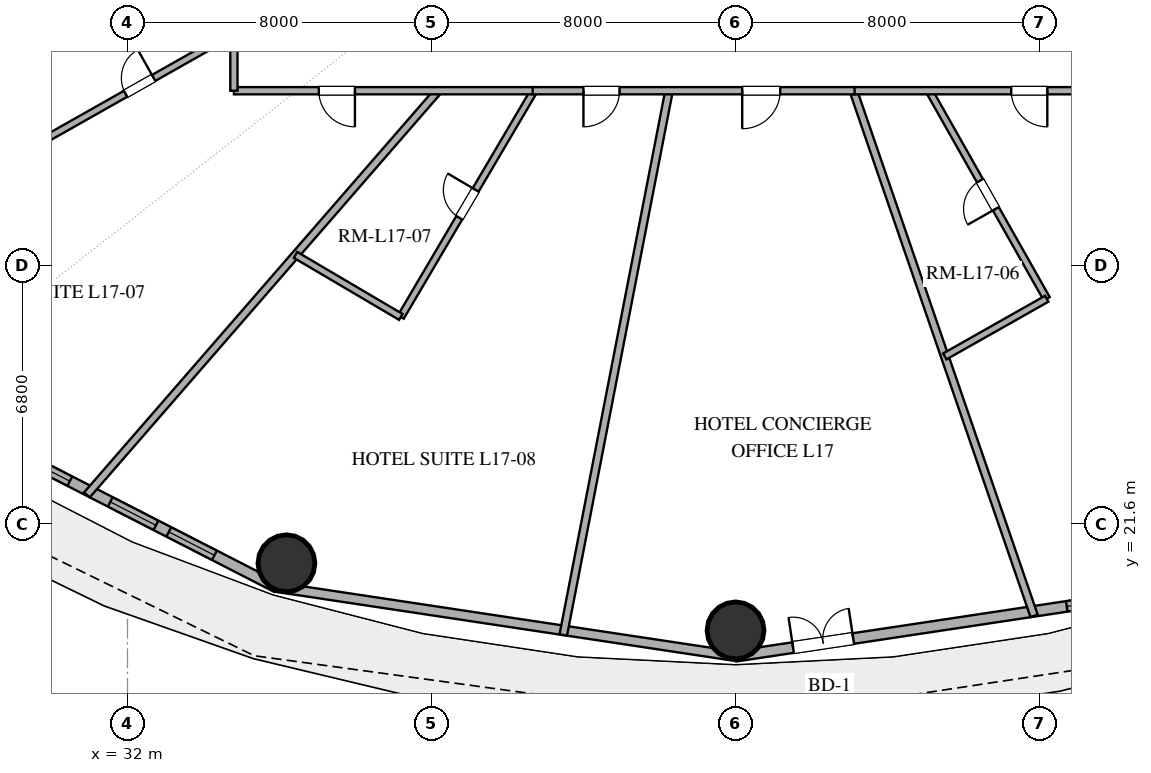
"""IFC4 building model, lengths in metres.
Left out: names, types, materials, properties, quantities, classifications, styles, units other than length and angle.
Written with IfcOpenShell. Run it as: python <this file> out.ifc"""

import sys

from ifc_helpers import new_model, si_unit, direction, frame, frame_2d, origin, origin_2d, place, context, subcontext, project, spatial, rectangle, hollow_circle, extrude, element, fill, save


model = new_model("IFC4")
c1 = context("Model", 3, precision=1e-05, world=origin(), true_north=direction((0.0, 1.0)))
c2 = subcontext(c1, "Body", "Model", "MODEL_VIEW")
j1 = project(units=[si_unit("LENGTHUNIT", "METRE"), si_unit("PLANEANGLEUNIT", "RADIAN")], contexts=[c1])
p1 = place(None, origin())
s1 = spatial("IfcSite", under=j1, at=p1, CompositionType="ELEMENT")
p2 = place(p1, origin())
s2 = spatial("IfcBuilding", under=s1, at=p2, CompositionType="ELEMENT")
p3 = place(p2, frame((0.0, 0.0, 71.4)))
s3 = spatial("IfcBuildingStorey", under=s2, at=p3, CompositionType="ELEMENT", Elevation=71.4)
for number, where, z_axis, x_axis in (
    (1, (36.182, 20.566, 0.0), (0.0, 0.0, 1.0), (1.0, 0.0, 0.0)),
    (2, (48.0, 18.8, 0.0), (0.0, 0.0, 1.0), (1.0, 0.0, 0.0)),
):
    element("IfcColumn", number, at=place(p3, frame(where, z_axis=z_axis, x_axis=x_axis)), inside=s3, PredefinedType="COLUMN", context=c2, shape_type="SweptSolid", body=[
        extrude(hollow_circle(Radius=0.75, WallThickness=0.04, at=origin_2d()), origin(), (0.0, 0.0, 1.0), 3.38),
    ])
p4 = place(p3, frame((25.826, 25.114, 0.0), z_axis=(0.0, 0.0, 1.0), x_axis=(0.889853976658, -0.456245438581, 0.0)))
e3 = element("IfcWall", 3, at=p4, inside=s3, PredefinedType="SOLIDWALL", context=c2, shape_type="SweptSolid", body=[
    extrude(rectangle(XDim=11.346, YDim=0.28, at=frame_2d((5.673, 0.0))), origin(), (0.0, 0.0, 1.0), 3.38),
])
p5 = place(p4, frame((1.92, 0.0, 0.85)))
e4 = element("IfcOpeningElement", 4, at=p5, cuts=e3, PredefinedType="OPENING", context=c2, shape_type="SweptSolid", body=[
    extrude(rectangle(XDim=1.5, YDim=1.8, at=frame_2d((0.75, 0.9))), frame((0.0, 0.15, 0.0), z_axis=(0.0, -1.0, 0.0), x_axis=(1.0, 0.0, 0.0)), (0.0, 0.0, 1.0), 0.3),
])
p6 = place(p4, frame((3.734, 0.0, 0.85)))
e5 = element("IfcOpeningElement", 5, at=p6, cuts=e3, PredefinedType="OPENING", context=c2, shape_type="SweptSolid", body=[
    extrude(rectangle(XDim=1.5, YDim=1.8, at=frame_2d((0.75, 0.9))), frame((0.0, 0.15, 0.0), z_axis=(0.0, -1.0, 0.0), x_axis=(1.0, 0.0, 0.0)), (0.0, 0.0, 1.0), 0.3),
])
p7 = place(p4, frame((6.429, 0.0, 0.85)))
e6 = element("IfcOpeningElement", 6, at=p7, cuts=e3, PredefinedType="OPENING", context=c2, shape_type="SweptSolid", body=[
    extrude(rectangle(XDim=1.35, YDim=1.8, at=frame_2d((0.675, 0.9))), frame((0.0, 0.15, 0.0), z_axis=(0.0, -1.0, 0.0), x_axis=(1.0, 0.0, 0.0)), (0.0, 0.0, 1.0), 0.3),
])
p8 = place(p4, frame((8.16, 0.0, 0.85)))
e7 = element("IfcOpeningElement", 7, at=p8, cuts=e3, PredefinedType="OPENING", context=c2, shape_type="SweptSolid", body=[
    extrude(rectangle(XDim=1.35, YDim=1.8, at=frame_2d((0.675, 0.9))), frame((0.0, 0.15, 0.0), z_axis=(0.0, -1.0, 0.0), x_axis=(1.0, 0.0, 0.0)), (0.0, 0.0, 1.0), 0.3),
])
p9 = place(p3, frame((35.922, 19.938, 0.0), z_axis=(0.0, 0.0, 1.0), x_axis=(0.988864835849, -0.148816452121, 0.0)))
e8 = element("IfcWall", 8, at=p9, inside=s3, PredefinedType="SOLIDWALL", context=c2, shape_type="SweptSolid", body=[
    extrude(rectangle(XDim=12.214, YDim=0.25, at=frame_2d((6.107, 0.0))), origin(), (0.0, 0.0, 1.0), 3.38),
])
p10 = place(p3, frame((48.0, 18.12, 0.0), z_axis=(0.0, 0.0, 1.0), x_axis=(0.988864835849, 0.148816452121, 0.0)))
e9 = element("IfcWall", 9, at=p10, inside=s3, PredefinedType="SOLIDWALL", context=c2, shape_type="SweptSolid", body=[
    extrude(rectangle(XDim=12.214, YDim=0.28, at=frame_2d((6.107, 0.0))), origin(), (0.0, 0.0, 1.0), 3.38),
])
p11 = place(p10, frame((1.531, 0.0, 0.0)))
e10 = element("IfcOpeningElement", 10, at=p11, cuts=e9, PredefinedType="OPENING", context=c2, shape_type="SweptSolid", body=[
    extrude(rectangle(XDim=1.6, YDim=2.25, at=frame_2d((0.8, 1.125))), frame((0.0, 0.15, 0.0), z_axis=(0.0, -1.0, 0.0), x_axis=(1.0, 0.0, 0.0)), (0.0, 0.0, 1.0), 0.3),
])
p12 = place(p10, frame((8.814, 0.0, 0.85)))
e11 = element("IfcOpeningElement", 11, at=p12, cuts=e9, PredefinedType="OPENING", context=c2, shape_type="SweptSolid", body=[
    extrude(rectangle(XDim=1.2, YDim=1.6, at=frame_2d((0.6, 0.8))), frame((0.0, 0.15, 0.0), z_axis=(0.0, -1.0, 0.0), x_axis=(1.0, 0.0, 0.0)), (0.0, 0.0, 1.0), 0.3),
])
p13 = place(p3, frame((43.467, 18.681, 0.0), z_axis=(0.0, 0.0, 1.0), x_axis=(0.190799326792, 0.981629062781, 0.0)))
e12 = element("IfcWall", 12, at=p13, inside=s3, PredefinedType="PARTITIONING", context=c2, shape_type="SweptSolid", body=[
    extrude(rectangle(XDim=14.587, YDim=0.2, at=frame_2d((7.293, 0.0))), origin(), (0.0, 0.0, 1.0), 2.74),
])
p14 = place(p3, frame((34.8, 37.455, 0.0), z_axis=(0.0, 0.0, 1.0), x_axis=(-0.945518845989, -0.325567369186, 0.0)))
e13 = element("IfcWall", 13, at=p14, inside=s3, PredefinedType="PARTITIONING", context=c2, shape_type="SweptSolid", body=[
    extrude(rectangle(XDim=15.909, YDim=0.2, at=frame_2d((7.955, 0.0))), origin(), (0.0, 0.0, 1.0), 2.74),
])
p15 = place(p3, frame((40.177, 33.0, 0.0), z_axis=(0.0, 0.0, 1.0), x_axis=(-0.656066321773, -0.754703240641, 0.0)))
e14 = element("IfcWall", 14, at=p15, inside=s3, PredefinedType="PARTITIONING", context=c2, shape_type="SweptSolid", body=[
    extrude(rectangle(XDim=14.091, YDim=0.2, at=frame_2d((7.045, 0.0))), origin(), (0.0, 0.0, 1.0), 2.74),
])
p16 = place(p3, frame((51.099, 33.0, 0.0), z_axis=(0.0, 0.0, 1.0), x_axis=(0.325569992405, -0.945517942741, 0.0)))
e15 = element("IfcWall", 15, at=p16, inside=s3, PredefinedType="PARTITIONING", context=c2, shape_type="SweptSolid", body=[
    extrude(rectangle(XDim=14.613, YDim=0.2, at=frame_2d((7.307, 0.0))), origin(), (0.0, 0.0, 1.0), 2.74),
])
p17 = place(p3, frame((39.193, 27.048, 0.0), z_axis=(0.0, 0.0, 1.0), x_axis=(0.507529744585, 0.861634236995, 0.0)))
e16 = element("IfcWall", 16, at=p17, inside=s3, PredefinedType="PLUMBINGWALL", context=c2, shape_type="SweptSolid", body=[
    extrude(rectangle(XDim=6.908, YDim=0.18, at=frame_2d((3.454, 0.0))), origin(), (0.0, 0.0, 1.0), 2.74),
])
p18 = place(p17, frame((3.029, 0.0, 0.0)))
e17 = element("IfcOpeningElement", 17, at=p18, cuts=e16, PredefinedType="OPENING", context=c2, shape_type="SweptSolid", body=[
    extrude(rectangle(XDim=0.85, YDim=2.1, at=frame_2d((0.425, 1.05))), frame((0.0, 0.1, 0.0), z_axis=(0.0, -1.0, 0.0), x_axis=(1.0, 0.0, 0.0)), (0.0, 0.0, 1.0), 0.2),
])
p19 = place(p3, frame((56.189, 27.527, 0.0), z_axis=(0.0, 0.0, 1.0), x_axis=(-0.492421798109, 0.870356692826, 0.0)))
e18 = element("IfcWall", 18, at=p19, inside=s3, PredefinedType="PLUMBINGWALL", context=c2, shape_type="SweptSolid", body=[
    extrude(rectangle(XDim=6.289, YDim=0.18, at=frame_2d((3.144, 0.0))), origin(), (0.0, 0.0, 1.0), 2.74),
])
p20 = place(p19, frame((2.719, 0.0, 0.0)))
e19 = element("IfcOpeningElement", 19, at=p20, cuts=e18, PredefinedType="OPENING", context=c2, shape_type="SweptSolid", body=[
    extrude(rectangle(XDim=0.85, YDim=2.1, at=frame_2d((0.425, 1.05))), frame((0.0, 0.1, 0.0), z_axis=(0.0, -1.0, 0.0), x_axis=(1.0, 0.0, 0.0)), (0.0, 0.0, 1.0), 0.2),
])
p21 = place(p3, frame((29.837, 31.724, 0.0), z_axis=(0.0, 0.0, 1.0), x_axis=(0.870364197206, 0.492408533865, 0.0)))
e20 = element("IfcWall", 20, at=p21, inside=s3, PredefinedType="PLUMBINGWALL", context=c2, shape_type="SweptSolid", body=[
    extrude(rectangle(XDim=5.702, YDim=0.18, at=frame_2d((2.851, 0.0))), origin(), (0.0, 0.0, 1.0), 2.74),
])
p22 = place(p21, frame((2.426, 0.0, 0.0)))
e21 = element("IfcOpeningElement", 21, at=p22, cuts=e20, PredefinedType="OPENING", context=c2, shape_type="SweptSolid", body=[
    extrude(rectangle(XDim=0.85, YDim=2.1, at=frame_2d((0.425, 1.05))), frame((0.0, 0.1, 0.0), z_axis=(0.0, -1.0, 0.0), x_axis=(1.0, 0.0, 0.0)), (0.0, 0.0, 1.0), 0.2),
])
p23 = place(p3, frame((42.736, 33.0, 0.0), z_axis=(0.0, 0.0, 1.0), x_axis=(-1.0, 0.0, 0.0)))
e22 = element("IfcWall", 22, at=p23, inside=s3, PredefinedType="PARTITIONING", context=c2, shape_type="SweptSolid", body=[
    extrude(rectangle(XDim=7.936, YDim=0.19, at=frame_2d((3.968, 0.0))), origin(), (0.0, 0.0, 1.0), 2.74),
])
p24 = place(p23, frame((4.751, 0.0, 0.0)))
e23 = element("IfcOpeningElement", 23, at=p24, cuts=e22, PredefinedType="OPENING", context=c2, shape_type="SweptSolid", body=[
    extrude(rectangle(XDim=0.95, YDim=2.15, at=frame_2d((0.475, 1.075))), frame((0.0, 0.105, 0.0), z_axis=(0.0, -1.0, 0.0), x_axis=(1.0, 0.0, 0.0)), (0.0, 0.0, 1.0), 0.21),
])
p25 = place(p3, frame((61.2, 33.0, 0.0), z_axis=(0.0, 0.0, 1.0), x_axis=(-1.0, 0.0, 0.0)))
e24 = element("IfcWall", 24, at=p25, inside=s3, PredefinedType="PARTITIONING", context=c2, shape_type="SweptSolid", body=[
    extrude(rectangle(XDim=10.135, YDim=0.19, at=frame_2d((5.067, 0.0))), origin(), (0.0, 0.0, 1.0), 2.74),
])
p26 = place(p25, frame((4.996, 0.0, 0.0)))
e25 = element("IfcOpeningElement", 25, at=p26, cuts=e24, PredefinedType="OPENING", context=c2, shape_type="SweptSolid", body=[
    extrude(rectangle(XDim=0.95, YDim=2.15, at=frame_2d((0.475, 1.075))), frame((0.0, 0.105, 0.0), z_axis=(0.0, -1.0, 0.0), x_axis=(1.0, 0.0, 0.0)), (0.0, 0.0, 1.0), 0.21),
])
p27 = place(p3, frame((51.133, 33.0, 0.0), z_axis=(0.0, 0.0, 1.0), x_axis=(-1.0, 0.0, 0.0)))
e26 = element("IfcWall", 26, at=p27, inside=s3, PredefinedType="PARTITIONING", context=c2, shape_type="SweptSolid", body=[
    extrude(rectangle(XDim=8.471, YDim=0.19, at=frame_2d((4.236, 0.0))), origin(), (0.0, 0.0, 1.0), 2.74),
])
p28 = place(p27, frame((1.957, 0.0, 0.0)))
e27 = element("IfcOpeningElement", 27, at=p28, cuts=e26, PredefinedType="OPENING", context=c2, shape_type="SweptSolid", body=[
    extrude(rectangle(XDim=1.0, YDim=2.2, at=frame_2d((0.5, 1.1))), frame((0.0, 0.105, 0.0), z_axis=(0.0, -1.0, 0.0), x_axis=(1.0, 0.0, 0.0)), (0.0, 0.0, 1.0), 0.21),
])
p29 = place(p27, frame((6.185, 0.0, 0.0)))
e28 = element("IfcOpeningElement", 28, at=p29, cuts=e26, PredefinedType="OPENING", context=c2, shape_type="SweptSolid", body=[
    extrude(rectangle(XDim=0.95, YDim=2.15, at=frame_2d((0.475, 1.075))), frame((0.0, 0.105, 0.0), z_axis=(0.0, -1.0, 0.0), x_axis=(1.0, 0.0, 0.0)), (0.0, 0.0, 1.0), 0.21),
])
p30 = place(p3, frame((34.8, 33.0, 0.0), z_axis=(0.0, 0.0, 1.0), x_axis=(0.0, 1.0, 0.0)))
e29 = element("IfcWall", 29, at=p30, inside=s3, PredefinedType="PARTITIONING", context=c2, shape_type="SweptSolid", body=[
    extrude(rectangle(XDim=9.147, YDim=0.19, at=frame_2d((4.574, 0.0))), origin(), (0.0, 0.0, 1.0), 2.74),
])
p31 = place(p30, frame((6.309, 0.0, 0.0)))
e30 = element("IfcOpeningElement", 30, at=p31, cuts=e29, PredefinedType="OPENING", context=c2, shape_type="SweptSolid", body=[
    extrude(rectangle(XDim=0.95, YDim=2.15, at=frame_2d((0.475, 1.075))), frame((0.0, 0.105, 0.0), z_axis=(0.0, -1.0, 0.0), x_axis=(1.0, 0.0, 0.0)), (0.0, 0.0, 1.0), 0.21),
])
p32 = place(p3, frame((36.421, 28.68, 0.0), z_axis=(0.0, 0.0, 1.0), x_axis=(0.861637458593, -0.507524275232, 0.0)))
e31 = element("IfcWall", 31, at=p32, inside=s3, PredefinedType="PLUMBINGWALL", context=c2, shape_type="SweptSolid", body=[
    extrude(rectangle(XDim=3.216, YDim=0.18, at=frame_2d((1.608, 0.0))), origin(), (0.0, 0.0, 1.0), 2.74),
])
p33 = place(p3, frame((53.506, 26.009, 0.0), z_axis=(0.0, 0.0, 1.0), x_axis=(0.87034589465, 0.492440883422, 0.0)))
e32 = element("IfcWall", 32, at=p33, inside=s3, PredefinedType="PLUMBINGWALL", context=c2, shape_type="SweptSolid", body=[
    extrude(rectangle(XDim=3.082, YDim=0.18, at=frame_2d((1.541, 0.0))), origin(), (0.0, 0.0, 1.0), 2.74),
])
p34 = place(p6, origin())
e33 = element("IfcWindow", 33, at=p34, inside=s3, PartitioningType="SINGLE_PANEL", PredefinedType="WINDOW", context=c2, shape_type="SweptSolid", body=[
    extrude(rectangle(XDim=1.5, YDim=1.8, at=frame_2d((0.75, 0.9))), frame((0.0, 0.03, 0.0), z_axis=(0.0, -1.0, 0.0), x_axis=(1.0, 0.0, 0.0)), (0.0, 0.0, 1.0), 0.06),
])
fill(e5, e33)
p35 = place(p7, origin())
e34 = element("IfcWindow", 34, at=p35, inside=s3, PartitioningType="SINGLE_PANEL", PredefinedType="WINDOW", context=c2, shape_type="SweptSolid", body=[
    extrude(rectangle(XDim=1.35, YDim=1.8, at=frame_2d((0.675, 0.9))), frame((0.0, 0.03, 0.0), z_axis=(0.0, -1.0, 0.0), x_axis=(1.0, 0.0, 0.0)), (0.0, 0.0, 1.0), 0.06),
])
fill(e6, e34)
p36 = place(p8, origin())
e35 = element("IfcWindow", 35, at=p36, inside=s3, PartitioningType="SINGLE_PANEL", PredefinedType="WINDOW", context=c2, shape_type="SweptSolid", body=[
    extrude(rectangle(XDim=1.35, YDim=1.8, at=frame_2d((0.675, 0.9))), frame((0.0, 0.03, 0.0), z_axis=(0.0, -1.0, 0.0), x_axis=(1.0, 0.0, 0.0)), (0.0, 0.0, 1.0), 0.06),
])
fill(e7, e35)
p37 = place(p11, origin())
e36 = element("IfcDoor", 36, at=p37, inside=s3, OperationType="DOUBLE_DOOR_SINGLE_SWING", PredefinedType="DOOR", context=c2, shape_type="SweptSolid", body=[
    extrude(rectangle(XDim=1.6, YDim=2.25, at=frame_2d((0.8, 1.125))), frame((0.0, 0.025, 0.0), z_axis=(0.0, -1.0, 0.0), x_axis=(1.0, 0.0, 0.0)), (0.0, 0.0, 1.0), 0.05),
])
fill(e10, e36)
p38 = place(p12, origin())
e37 = element("IfcWindow", 37, at=p38, inside=s3, PartitioningType="SINGLE_PANEL", PredefinedType="WINDOW", context=c2, shape_type="SweptSolid", body=[
    extrude(rectangle(XDim=1.2, YDim=1.6, at=frame_2d((0.6, 0.8))), frame((0.0, 0.03, 0.0), z_axis=(0.0, -1.0, 0.0), x_axis=(1.0, 0.0, 0.0)), (0.0, 0.0, 1.0), 0.06),
])
fill(e11, e37)
p39 = place(p18, origin())
e38 = element("IfcDoor", 38, at=p39, inside=s3, OperationType="SINGLE_SWING_RIGHT", PredefinedType="DOOR", context=c2, shape_type="SweptSolid", body=[
    extrude(rectangle(XDim=0.85, YDim=2.1, at=frame_2d((0.425, 1.05))), frame((0.0, 0.025, 0.0), z_axis=(0.0, -1.0, 0.0), x_axis=(1.0, 0.0, 0.0)), (0.0, 0.0, 1.0), 0.05),
])
fill(e17, e38)
p40 = place(p20, origin())
e39 = element("IfcDoor", 39, at=p40, inside=s3, OperationType="SINGLE_SWING_LEFT", PredefinedType="DOOR", context=c2, shape_type="SweptSolid", body=[
    extrude(rectangle(XDim=0.85, YDim=2.1, at=frame_2d((0.425, 1.05))), frame((0.0, 0.025, 0.0), z_axis=(0.0, -1.0, 0.0), x_axis=(1.0, 0.0, 0.0)), (0.0, 0.0, 1.0), 0.05),
])
fill(e19, e39)
p41 = place(p22, origin())
e40 = element("IfcDoor", 40, at=p41, inside=s3, OperationType="SINGLE_SWING_RIGHT", PredefinedType="DOOR", context=c2, shape_type="SweptSolid", body=[
    extrude(rectangle(XDim=0.85, YDim=2.1, at=frame_2d((0.425, 1.05))), frame((0.0, 0.025, 0.0), z_axis=(0.0, -1.0, 0.0), x_axis=(1.0, 0.0, 0.0)), (0.0, 0.0, 1.0), 0.05),
])
fill(e21, e40)
p42 = place(p24, origin())
e41 = element("IfcDoor", 41, at=p42, inside=s3, OperationType="SINGLE_SWING_LEFT", PredefinedType="DOOR", context=c2, shape_type="SweptSolid", body=[
    extrude(rectangle(XDim=0.95, YDim=2.15, at=frame_2d((0.475, 1.075))), frame((0.0, 0.025, 0.0), z_axis=(0.0, -1.0, 0.0), x_axis=(1.0, 0.0, 0.0)), (0.0, 0.0, 1.0), 0.05),
])
fill(e23, e41)
p43 = place(p26, origin())
e42 = element("IfcDoor", 42, at=p43, inside=s3, OperationType="SINGLE_SWING_LEFT", PredefinedType="DOOR", context=c2, shape_type="SweptSolid", body=[
    extrude(rectangle(XDim=0.95, YDim=2.15, at=frame_2d((0.475, 1.075))), frame((0.0, 0.025, 0.0), z_axis=(0.0, -1.0, 0.0), x_axis=(1.0, 0.0, 0.0)), (0.0, 0.0, 1.0), 0.05),
])
fill(e25, e42)
p44 = place(p28, origin())
e43 = element("IfcDoor", 43, at=p44, inside=s3, OperationType="SINGLE_SWING_RIGHT", PredefinedType="DOOR", context=c2, shape_type="SweptSolid", body=[
    extrude(rectangle(XDim=1.0, YDim=2.2, at=frame_2d((0.5, 1.1))), frame((0.0, 0.025, 0.0), z_axis=(0.0, -1.0, 0.0), x_axis=(1.0, 0.0, 0.0)), (0.0, 0.0, 1.0), 0.05),
])
fill(e27, e43)
p45 = place(p29, origin())
e44 = element("IfcDoor", 44, at=p45, inside=s3, OperationType="SINGLE_SWING_RIGHT", PredefinedType="DOOR", context=c2, shape_type="SweptSolid", body=[
    extrude(rectangle(XDim=0.95, YDim=2.15, at=frame_2d((0.475, 1.075))), frame((0.0, 0.025, 0.0), z_axis=(0.0, -1.0, 0.0), x_axis=(1.0, 0.0, 0.0)), (0.0, 0.0, 1.0), 0.05),
])
fill(e28, e44)
save(model, sys.argv[1])
